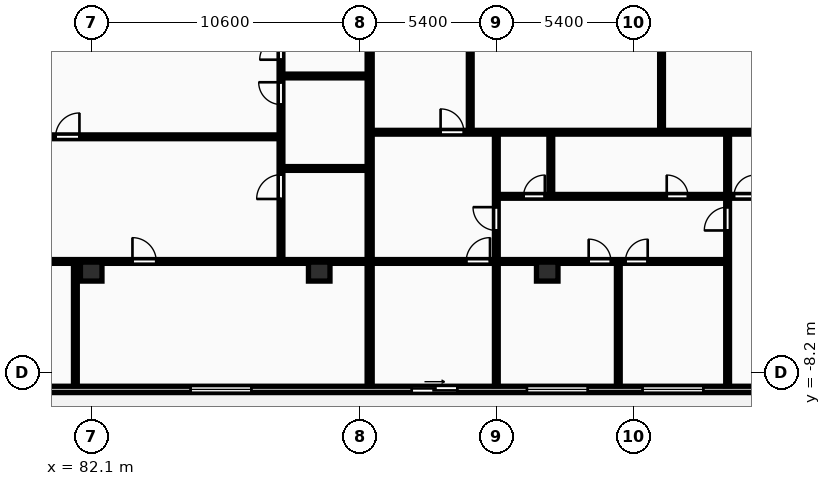
"""IFC4 building model, lengths in metres.
Left out: names, types, materials, properties, quantities, classifications, styles, units other than length and angle.
Written with IfcOpenShell. Run it as: python <this file> out.ifc"""

import sys

from ifc_helpers import new_model, si_unit, direction, frame, frame_2d, origin, origin_2d, place, context, subcontext, project, spatial, rectangle, extrude, element, fill, save


model = new_model("IFC4")
c1 = context("Model", 3, precision=1e-05, world=origin(), true_north=direction((0.0, 1.0)))
c2 = subcontext(c1, "Body", "Model", "MODEL_VIEW")
j1 = project(units=[si_unit("LENGTHUNIT", "METRE"), si_unit("PLANEANGLEUNIT", "RADIAN")], contexts=[c1])
p1 = place(None, origin())
s1 = spatial("IfcSite", under=j1, at=p1, CompositionType="ELEMENT")
p2 = place(p1, origin())
s2 = spatial("IfcBuilding", under=s1, at=p2, CompositionType="ELEMENT")
p3 = place(p2, frame((0.0, 0.0, 119.8)))
s3 = spatial("IfcBuildingStorey", under=s2, at=p3, CompositionType="ELEMENT", Elevation=119.8)
for number, where, z_axis, x_axis in (
    (1, (82.1, -4.2, 0.0), (0.0, 0.0, 1.0), (1.0, 0.0, 0.0)),
    (2, (91.1, -4.2, 0.0), (0.0, 0.0, 1.0), (1.0, 0.0, 0.0)),
    (3, (100.1, -4.2, 0.0), (0.0, 0.0, 1.0), (1.0, 0.0, 0.0)),
):
    element("IfcColumn", number, at=place(p3, frame(where, z_axis=z_axis, x_axis=x_axis)), inside=s3, PredefinedType="COLUMN", context=c2, shape_type="SweptSolid", body=[
        extrude(rectangle(XDim=0.85, YDim=0.75, at=origin_2d()), origin(), (0.0, 0.0, 1.0), 3.25),
    ])
p4 = place(p3, frame((72.7, -8.85, 0.0), z_axis=(0.0, 0.0, 1.0), x_axis=(1.0, 0.0, 0.0)))
e4 = element("IfcWall", 4, at=p4, inside=s3, PredefinedType="STANDARD", context=c2, shape_type="SweptSolid", body=[
    extrude(rectangle(XDim=58.0, YDim=0.25, at=frame_2d((29.0, 0.0))), origin(), (0.0, 0.0, 1.0), 2.97),
])
p5 = place(p4, frame((3.548, 0.0, 0.0)))
e5 = element("IfcOpeningElement", 5, at=p5, cuts=e4, PredefinedType="OPENING", context=c2, shape_type="SweptSolid", body=[
    extrude(rectangle(XDim=1.8, YDim=2.2, at=frame_2d((0.9, 1.1))), frame((0.0, 0.135, 0.0), z_axis=(0.0, -1.0, 0.0), x_axis=(1.0, 0.0, 0.0)), (0.0, 0.0, 1.0), 0.27),
])
p6 = place(p4, frame((13.323, 0.0, 0.85)))
e6 = element("IfcOpeningElement", 6, at=p6, cuts=e4, PredefinedType="OPENING", context=c2, shape_type="SweptSolid", body=[
    extrude(rectangle(XDim=2.4, YDim=1.9, at=frame_2d((1.2, 0.95))), frame((0.0, 0.135, 0.0), z_axis=(0.0, -1.0, 0.0), x_axis=(1.0, 0.0, 0.0)), (0.0, 0.0, 1.0), 0.27),
])
p7 = place(p4, frame((26.598, 0.0, 0.85)))
e7 = element("IfcOpeningElement", 7, at=p7, cuts=e4, PredefinedType="OPENING", context=c2, shape_type="SweptSolid", body=[
    extrude(rectangle(XDim=2.4, YDim=1.9, at=frame_2d((1.2, 0.95))), frame((0.0, 0.135, 0.0), z_axis=(0.0, -1.0, 0.0), x_axis=(1.0, 0.0, 0.0)), (0.0, 0.0, 1.0), 0.27),
])
p8 = place(p4, frame((31.163, 0.0, 0.85)))
e8 = element("IfcOpeningElement", 8, at=p8, cuts=e4, PredefinedType="OPENING", context=c2, shape_type="SweptSolid", body=[
    extrude(rectangle(XDim=2.4, YDim=1.9, at=frame_2d((1.2, 0.95))), frame((0.0, 0.135, 0.0), z_axis=(0.0, -1.0, 0.0), x_axis=(1.0, 0.0, 0.0)), (0.0, 0.0, 1.0), 0.27),
])
p9 = place(p4, frame((22.051, 0.0, 0.0)))
e9 = element("IfcOpeningElement", 9, at=p9, cuts=e4, PredefinedType="OPENING", context=c2, shape_type="SweptSolid", body=[
    extrude(rectangle(XDim=1.8, YDim=2.2, at=frame_2d((0.9, 1.1))), frame((0.0, 0.135, 0.0), z_axis=(0.0, -1.0, 0.0), x_axis=(1.0, 0.0, 0.0)), (0.0, 0.0, 1.0), 0.27),
])
p10 = place(p4, frame((35.861, 0.0, 0.85)))
e10 = element("IfcOpeningElement", 10, at=p10, cuts=e4, PredefinedType="OPENING", context=c2, shape_type="SweptSolid", body=[
    extrude(rectangle(XDim=2.4, YDim=1.9, at=frame_2d((1.2, 0.95))), frame((0.0, 0.135, 0.0), z_axis=(0.0, -1.0, 0.0), x_axis=(1.0, 0.0, 0.0)), (0.0, 0.0, 1.0), 0.27),
])
p11 = place(p4, frame((49.165, 0.0, 0.85)))
e11 = element("IfcOpeningElement", 11, at=p11, cuts=e4, PredefinedType="OPENING", context=c2, shape_type="SweptSolid", body=[
    extrude(rectangle(XDim=2.4, YDim=1.9, at=frame_2d((1.2, 0.95))), frame((0.0, 0.135, 0.0), z_axis=(0.0, -1.0, 0.0), x_axis=(1.0, 0.0, 0.0)), (0.0, 0.0, 1.0), 0.27),
])
p12 = place(p4, frame((42.661, 0.0, 0.0)))
e12 = element("IfcOpeningElement", 12, at=p12, cuts=e4, PredefinedType="OPENING", context=c2, shape_type="SweptSolid", body=[
    extrude(rectangle(XDim=1.8, YDim=2.2, at=frame_2d((0.9, 1.1))), frame((0.0, 0.135, 0.0), z_axis=(0.0, -1.0, 0.0), x_axis=(1.0, 0.0, 0.0)), (0.0, 0.0, 1.0), 0.27),
])
p13 = place(p4, frame((54.465, 0.0, 0.85)))
e13 = element("IfcOpeningElement", 13, at=p13, cuts=e4, PredefinedType="OPENING", context=c2, shape_type="SweptSolid", body=[
    extrude(rectangle(XDim=2.4, YDim=1.9, at=frame_2d((1.2, 0.95))), frame((0.0, 0.135, 0.0), z_axis=(0.0, -1.0, 0.0), x_axis=(1.0, 0.0, 0.0)), (0.0, 0.0, 1.0), 0.27),
])
p14 = place(p3, frame((93.091, -8.7, 0.0), z_axis=(0.0, 0.0, 1.0), x_axis=(0.0, 1.0, 0.0)))
e14 = element("IfcWall", 14, at=p14, inside=s3, PredefinedType="PARTITIONING", context=c2, shape_type="SweptSolid", body=[
    extrude(rectangle(XDim=24.57, YDim=0.2, at=frame_2d((12.285, 0.0))), origin(), (0.0, 0.0, 1.0), 2.97),
])
p15 = place(p3, frame((72.78, 1.12, 0.0), z_axis=(0.0, 0.0, 1.0), x_axis=(1.0, 0.0, 0.0)))
e15 = element("IfcWall", 15, at=p15, inside=s3, PredefinedType="PARTITIONING", context=c2, shape_type="SweptSolid", body=[
    extrude(rectangle(XDim=16.771, YDim=0.15, at=frame_2d((8.385, 0.0))), origin(), (0.0, 0.0, 1.0), 2.97),
])
p16 = place(p15, frame((7.915, 0.0, 0.0)))
e16 = element("IfcOpeningElement", 16, at=p16, cuts=e15, PredefinedType="OPENING", context=c2, shape_type="SweptSolid", body=[
    extrude(rectangle(XDim=0.94, YDim=2.1, at=frame_2d((0.47, 1.05))), frame((0.0, 0.085, 0.0), z_axis=(0.0, -1.0, 0.0), x_axis=(1.0, 0.0, 0.0)), (0.0, 0.0, 1.0), 0.17),
])
for number, where, z_axis, x_axis in (
    (17, (89.651, -0.13, 0.0), (0.0, 0.0, 1.0), (1.0, 0.0, 0.0)),
    (18, (89.651, 3.52, 0.0), (0.0, 0.0, 1.0), (1.0, 0.0, 0.0)),
):
    element("IfcWall", number, at=place(p3, frame(where, z_axis=z_axis, x_axis=x_axis)), inside=s3, PredefinedType="PARTITIONING", context=c2, shape_type="SweptSolid", body=[
        extrude(rectangle(XDim=3.36, YDim=0.15, at=frame_2d((1.68, 0.0))), origin(), (0.0, 0.0, 1.0), 2.97),
    ])
p17 = place(p3, frame((89.591, -3.74, 0.0), z_axis=(0.0, 0.0, 1.0), x_axis=(0.0, 1.0, 0.0)))
e19 = element("IfcWall", 19, at=p17, inside=s3, PredefinedType="PARTITIONING", context=c2, shape_type="SweptSolid", body=[
    extrude(rectangle(XDim=19.63, YDim=0.15, at=frame_2d((9.815, 0.0))), origin(), (0.0, 0.0, 1.0), 2.97),
])
p18 = place(p17, frame((2.406, 0.0, 0.0)))
e20 = element("IfcOpeningElement", 20, at=p18, cuts=e19, PredefinedType="OPENING", context=c2, shape_type="SweptSolid", body=[
    extrude(rectangle(XDim=0.96, YDim=2.1, at=frame_2d((0.48, 1.05))), frame((0.0, 0.085, 0.0), z_axis=(0.0, -1.0, 0.0), x_axis=(1.0, 0.0, 0.0)), (0.0, 0.0, 1.0), 0.17),
])
p19 = place(p17, frame((6.133, 0.0, 0.0)))
e21 = element("IfcOpeningElement", 21, at=p19, cuts=e19, PredefinedType="OPENING", context=c2, shape_type="SweptSolid", body=[
    extrude(rectangle(XDim=0.88, YDim=2.06, at=frame_2d((0.44, 1.03))), frame((0.0, 0.085, 0.0), z_axis=(0.0, -1.0, 0.0), x_axis=(1.0, 0.0, 0.0)), (0.0, 0.0, 1.0), 0.17),
])
p20 = place(p17, frame((7.903, 0.0, 0.0)))
e22 = element("IfcOpeningElement", 22, at=p20, cuts=e19, PredefinedType="OPENING", context=c2, shape_type="SweptSolid", body=[
    extrude(rectangle(XDim=0.84, YDim=2.04, at=frame_2d((0.42, 1.02))), frame((0.0, 0.085, 0.0), z_axis=(0.0, -1.0, 0.0), x_axis=(1.0, 0.0, 0.0)), (0.0, 0.0, 1.0), 0.17),
])
p21 = place(p3, frame((81.475, -8.7, 0.0), z_axis=(0.0, 0.0, 1.0), x_axis=(0.0, 1.0, 0.0)))
e23 = element("IfcWall", 23, at=p21, inside=s3, PredefinedType="PARTITIONING", context=c2, shape_type="SweptSolid", body=[
    extrude(rectangle(XDim=4.82, YDim=0.15, at=frame_2d((2.41, 0.0))), origin(), (0.0, 0.0, 1.0), 2.97),
])
p22 = place(p3, frame((72.78, -3.8, 0.0), z_axis=(0.0, 0.0, 1.0), x_axis=(1.0, 0.0, 0.0)))
e24 = element("IfcWall", 24, at=p22, inside=s3, PredefinedType="PARTITIONING", context=c2, shape_type="SweptSolid", body=[
    extrude(rectangle(XDim=20.231, YDim=0.15, at=frame_2d((10.115, 0.0))), origin(), (0.0, 0.0, 1.0), 2.97),
])
p23 = place(p22, frame((6.635, 0.0, 0.0)))
e25 = element("IfcOpeningElement", 25, at=p23, cuts=e24, PredefinedType="OPENING", context=c2, shape_type="SweptSolid", body=[
    extrude(rectangle(XDim=0.94, YDim=2.1, at=frame_2d((0.47, 1.05))), frame((0.0, 0.085, 0.0), z_axis=(0.0, -1.0, 0.0), x_axis=(1.0, 0.0, 0.0)), (0.0, 0.0, 1.0), 0.17),
])
p24 = place(p22, frame((10.948, 0.0, 0.0)))
e26 = element("IfcOpeningElement", 26, at=p24, cuts=e24, PredefinedType="OPENING", context=c2, shape_type="SweptSolid", body=[
    extrude(rectangle(XDim=0.94, YDim=2.1, at=frame_2d((0.47, 1.05))), frame((0.0, 0.085, 0.0), z_axis=(0.0, -1.0, 0.0), x_axis=(1.0, 0.0, 0.0)), (0.0, 0.0, 1.0), 0.17),
])
p25 = place(p3, frame((104.612, 1.34, 0.0), z_axis=(0.0, 0.0, 1.0), x_axis=(0.0, 1.0, 0.0)))
e27 = element("IfcWall", 27, at=p25, inside=s3, PredefinedType="PARTITIONING", context=c2, shape_type="SweptSolid", body=[
    extrude(rectangle(XDim=14.55, YDim=0.15, at=frame_2d((7.275, 0.0))), origin(), (0.0, 0.0, 1.0), 2.97),
])
p26 = place(p25, frame((6.365, 0.0, 0.0)))
e28 = element("IfcOpeningElement", 28, at=p26, cuts=e27, PredefinedType="OPENING", context=c2, shape_type="SweptSolid", body=[
    extrude(rectangle(XDim=0.84, YDim=2.04, at=frame_2d((0.42, 1.02))), frame((0.0, 0.085, 0.0), z_axis=(0.0, -1.0, 0.0), x_axis=(1.0, 0.0, 0.0)), (0.0, 0.0, 1.0), 0.17),
])
p27 = place(p25, frame((7.705, 0.0, 0.0)))
e29 = element("IfcOpeningElement", 29, at=p27, cuts=e27, PredefinedType="OPENING", context=c2, shape_type="SweptSolid", body=[
    extrude(rectangle(XDim=0.88, YDim=2.06, at=frame_2d((0.44, 1.03))), frame((0.0, 0.085, 0.0), z_axis=(0.0, -1.0, 0.0), x_axis=(1.0, 0.0, 0.0)), (0.0, 0.0, 1.0), 0.17),
])
p28 = place(p3, frame((97.061, 1.34, 0.0), z_axis=(0.0, 0.0, 1.0), x_axis=(0.0, 1.0, 0.0)))
e30 = element("IfcWall", 30, at=p28, inside=s3, PredefinedType="PARTITIONING", context=c2, shape_type="SweptSolid", body=[
    extrude(rectangle(XDim=14.55, YDim=0.15, at=frame_2d((7.275, 0.0))), origin(), (0.0, 0.0, 1.0), 2.97),
])
p29 = place(p28, frame((6.325, 0.0, 0.0)))
e31 = element("IfcOpeningElement", 31, at=p29, cuts=e30, PredefinedType="OPENING", context=c2, shape_type="SweptSolid", body=[
    extrude(rectangle(XDim=0.88, YDim=2.06, at=frame_2d((0.44, 1.03))), frame((0.0, 0.085, 0.0), z_axis=(0.0, -1.0, 0.0), x_axis=(1.0, 0.0, 0.0)), (0.0, 0.0, 1.0), 0.17),
])
p30 = place(p3, frame((100.241, -1.21, 0.0), z_axis=(0.0, 0.0, 1.0), x_axis=(0.0, 1.0, 0.0)))
e32 = element("IfcWall", 32, at=p30, inside=s3, PredefinedType="PARTITIONING", context=c2, shape_type="SweptSolid", body=[
    extrude(rectangle(XDim=2.47, YDim=0.15, at=frame_2d((1.235, 0.0))), origin(), (0.0, 0.0, 1.0), 2.2),
])
p31 = place(p3, frame((102.906, -8.7, 0.0), z_axis=(0.0, 0.0, 1.0), x_axis=(0.0, 1.0, 0.0)))
e33 = element("IfcWall", 33, at=p31, inside=s3, PredefinedType="PARTITIONING", context=c2, shape_type="SweptSolid", body=[
    extrude(rectangle(XDim=4.82, YDim=0.15, at=frame_2d((2.41, 0.0))), origin(), (0.0, 0.0, 1.0), 2.97),
])
p32 = place(p3, frame((98.091, -8.7, 0.0), z_axis=(0.0, 0.0, 1.0), x_axis=(0.0, 1.0, 0.0)))
e34 = element("IfcWall", 34, at=p32, inside=s3, PredefinedType="PARTITIONING", context=c2, shape_type="SweptSolid", body=[
    extrude(rectangle(XDim=9.96, YDim=0.15, at=frame_2d((4.98, 0.0))), origin(), (0.0, 0.0, 1.0), 2.97),
])
p33 = place(p32, frame((6.123, 0.0, 0.0)))
e35 = element("IfcOpeningElement", 35, at=p33, cuts=e34, PredefinedType="OPENING", context=c2, shape_type="SweptSolid", body=[
    extrude(rectangle(XDim=0.92, YDim=2.08, at=frame_2d((0.46, 1.04))), frame((0.0, 0.085, 0.0), z_axis=(0.0, -1.0, 0.0), x_axis=(1.0, 0.0, 0.0)), (0.0, 0.0, 1.0), 0.17),
])
p34 = place(p3, frame((107.22, -1.21, 0.0), z_axis=(0.0, 0.0, 1.0), x_axis=(0.0, 1.0, 0.0)))
e36 = element("IfcWall", 36, at=p34, inside=s3, PredefinedType="PARTITIONING", context=c2, shape_type="SweptSolid", body=[
    extrude(rectangle(XDim=2.47, YDim=0.15, at=frame_2d((1.235, 0.0))), origin(), (0.0, 0.0, 1.0), 2.97),
])
p35 = place(p3, frame((107.22, -8.7, 0.0), z_axis=(0.0, 0.0, 1.0), x_axis=(0.0, 1.0, 0.0)))
e37 = element("IfcWall", 37, at=p35, inside=s3, PredefinedType="PARTITIONING", context=c2, shape_type="SweptSolid", body=[
    extrude(rectangle(XDim=7.45, YDim=0.15, at=frame_2d((3.725, 0.0))), origin(), (0.0, 0.0, 1.0), 2.97),
])
p36 = place(p35, frame((6.123, 0.0, 0.0)))
e38 = element("IfcOpeningElement", 38, at=p36, cuts=e37, PredefinedType="OPENING", context=c2, shape_type="SweptSolid", body=[
    extrude(rectangle(XDim=0.92, YDim=2.08, at=frame_2d((0.46, 1.04))), frame((0.0, 0.085, 0.0), z_axis=(0.0, -1.0, 0.0), x_axis=(1.0, 0.0, 0.0)), (0.0, 0.0, 1.0), 0.17),
])
p37 = place(p3, frame((98.131, -1.23, 0.0), z_axis=(0.0, 0.0, 1.0), x_axis=(1.0, 0.0, 0.0)))
e39 = element("IfcWall", 39, at=p37, inside=s3, PredefinedType="PARTITIONING", context=c2, shape_type="SweptSolid", body=[
    extrude(rectangle(XDim=14.212, YDim=0.15, at=frame_2d((7.106, 0.0))), origin(), (0.0, 0.0, 1.0), 2.97),
])
p38 = place(p37, frame((1.034, 0.0, 0.0)))
e40 = element("IfcOpeningElement", 40, at=p38, cuts=e39, PredefinedType="OPENING", context=c2, shape_type="SweptSolid", body=[
    extrude(rectangle(XDim=0.84, YDim=2.04, at=frame_2d((0.42, 1.02))), frame((0.0, 0.085, 0.0), z_axis=(0.0, -1.0, 0.0), x_axis=(1.0, 0.0, 0.0)), (0.0, 0.0, 1.0), 0.17),
])
p39 = place(p37, frame((6.686, 0.0, 0.0)))
e41 = element("IfcOpeningElement", 41, at=p39, cuts=e39, PredefinedType="OPENING", context=c2, shape_type="SweptSolid", body=[
    extrude(rectangle(XDim=0.84, YDim=2.04, at=frame_2d((0.42, 1.02))), frame((0.0, 0.085, 0.0), z_axis=(0.0, -1.0, 0.0), x_axis=(1.0, 0.0, 0.0)), (0.0, 0.0, 1.0), 0.17),
])
p40 = place(p37, frame((9.339, 0.0, 0.0)))
e42 = element("IfcOpeningElement", 42, at=p40, cuts=e39, PredefinedType="OPENING", context=c2, shape_type="SweptSolid", body=[
    extrude(rectangle(XDim=0.84, YDim=2.04, at=frame_2d((0.42, 1.02))), frame((0.0, 0.085, 0.0), z_axis=(0.0, -1.0, 0.0), x_axis=(1.0, 0.0, 0.0)), (0.0, 0.0, 1.0), 0.17),
])
p41 = place(p3, frame((93.171, 1.3, 0.0), z_axis=(0.0, 0.0, 1.0), x_axis=(1.0, 0.0, 0.0)))
e43 = element("IfcWall", 43, at=p41, inside=s3, PredefinedType="PARTITIONING", context=c2, shape_type="SweptSolid", body=[
    extrude(rectangle(XDim=19.172, YDim=0.15, at=frame_2d((9.586, 0.0))), origin(), (0.0, 0.0, 1.0), 2.97),
])
p42 = place(p41, frame((2.72, 0.0, 0.0)))
e44 = element("IfcOpeningElement", 44, at=p42, cuts=e43, PredefinedType="OPENING", context=c2, shape_type="SweptSolid", body=[
    extrude(rectangle(XDim=0.92, YDim=2.08, at=frame_2d((0.46, 1.04))), frame((0.0, 0.085, 0.0), z_axis=(0.0, -1.0, 0.0), x_axis=(1.0, 0.0, 0.0)), (0.0, 0.0, 1.0), 0.17),
])
p43 = place(p3, frame((93.171, -3.8, 0.0), z_axis=(0.0, 0.0, 1.0), x_axis=(1.0, 0.0, 0.0)))
e45 = element("IfcWall", 45, at=p43, inside=s3, PredefinedType="PARTITIONING", context=c2, shape_type="SweptSolid", body=[
    extrude(rectangle(XDim=14.049, YDim=0.15, at=frame_2d((7.024, 0.0))), origin(), (0.0, 0.0, 1.0), 2.97),
])
p44 = place(p43, frame((3.73, 0.0, 0.0)))
e46 = element("IfcOpeningElement", 46, at=p44, cuts=e45, PredefinedType="OPENING", context=c2, shape_type="SweptSolid", body=[
    extrude(rectangle(XDim=0.94, YDim=2.1, at=frame_2d((0.47, 1.05))), frame((0.0, 0.085, 0.0), z_axis=(0.0, -1.0, 0.0), x_axis=(1.0, 0.0, 0.0)), (0.0, 0.0, 1.0), 0.17),
])
p45 = place(p43, frame((8.565, 0.0, 0.0)))
e47 = element("IfcOpeningElement", 47, at=p45, cuts=e45, PredefinedType="OPENING", context=c2, shape_type="SweptSolid", body=[
    extrude(rectangle(XDim=0.88, YDim=2.06, at=frame_2d((0.44, 1.03))), frame((0.0, 0.085, 0.0), z_axis=(0.0, -1.0, 0.0), x_axis=(1.0, 0.0, 0.0)), (0.0, 0.0, 1.0), 0.17),
])
p46 = place(p43, frame((10.014, 0.0, 0.0)))
e48 = element("IfcOpeningElement", 48, at=p46, cuts=e45, PredefinedType="OPENING", context=c2, shape_type="SweptSolid", body=[
    extrude(rectangle(XDim=0.88, YDim=2.06, at=frame_2d((0.44, 1.03))), frame((0.0, 0.085, 0.0), z_axis=(0.0, -1.0, 0.0), x_axis=(1.0, 0.0, 0.0)), (0.0, 0.0, 1.0), 0.17),
])
p47 = place(p6, origin())
e49 = element("IfcWindow", 49, at=p47, inside=s3, PartitioningType="DOUBLE_PANEL_VERTICAL", PredefinedType="WINDOW", context=c2, shape_type="SweptSolid", body=[
    extrude(rectangle(XDim=2.4, YDim=1.9, at=frame_2d((1.2, 0.95))), frame((0.0, 0.03, 0.0), z_axis=(0.0, -1.0, 0.0), x_axis=(1.0, 0.0, 0.0)), (0.0, 0.0, 1.0), 0.06),
])
fill(e6, e49)
p48 = place(p7, origin())
e50 = element("IfcWindow", 50, at=p48, inside=s3, PartitioningType="DOUBLE_PANEL_VERTICAL", PredefinedType="WINDOW", context=c2, shape_type="SweptSolid", body=[
    extrude(rectangle(XDim=2.4, YDim=1.9, at=frame_2d((1.2, 0.95))), frame((0.0, 0.03, 0.0), z_axis=(0.0, -1.0, 0.0), x_axis=(1.0, 0.0, 0.0)), (0.0, 0.0, 1.0), 0.06),
])
fill(e7, e50)
p49 = place(p8, origin())
e51 = element("IfcWindow", 51, at=p49, inside=s3, PartitioningType="DOUBLE_PANEL_VERTICAL", PredefinedType="WINDOW", context=c2, shape_type="SweptSolid", body=[
    extrude(rectangle(XDim=2.4, YDim=1.9, at=frame_2d((1.2, 0.95))), frame((0.0, 0.03, 0.0), z_axis=(0.0, -1.0, 0.0), x_axis=(1.0, 0.0, 0.0)), (0.0, 0.0, 1.0), 0.06),
])
fill(e8, e51)
p50 = place(p9, origin())
e52 = element("IfcDoor", 52, at=p50, inside=s3, OperationType="SLIDING_TO_RIGHT", PredefinedType="DOOR", context=c2, shape_type="SweptSolid", body=[
    extrude(rectangle(XDim=1.8, YDim=2.2, at=frame_2d((0.9, 1.1))), frame((0.0, 0.025, 0.0), z_axis=(0.0, -1.0, 0.0), x_axis=(1.0, 0.0, 0.0)), (0.0, 0.0, 1.0), 0.05),
])
fill(e9, e52)
p51 = place(p16, origin())
e53 = element("IfcDoor", 53, at=p51, inside=s3, OperationType="SINGLE_SWING_RIGHT", PredefinedType="DOOR", context=c2, shape_type="SweptSolid", body=[
    extrude(rectangle(XDim=0.94, YDim=2.1, at=frame_2d((0.47, 1.05))), frame((0.0, 0.025, 0.0), z_axis=(0.0, -1.0, 0.0), x_axis=(1.0, 0.0, 0.0)), (0.0, 0.0, 1.0), 0.05),
])
fill(e16, e53)
p52 = place(p18, origin())
e54 = element("IfcDoor", 54, at=p52, inside=s3, OperationType="SINGLE_SWING_LEFT", PredefinedType="DOOR", context=c2, shape_type="SweptSolid", body=[
    extrude(rectangle(XDim=0.96, YDim=2.1, at=frame_2d((0.48, 1.05))), frame((0.0, 0.025, 0.0), z_axis=(0.0, -1.0, 0.0), x_axis=(1.0, 0.0, 0.0)), (0.0, 0.0, 1.0), 0.05),
])
fill(e20, e54)
p53 = place(p19, origin())
e55 = element("IfcDoor", 55, at=p53, inside=s3, OperationType="SINGLE_SWING_RIGHT", PredefinedType="DOOR", context=c2, shape_type="SweptSolid", body=[
    extrude(rectangle(XDim=0.88, YDim=2.06, at=frame_2d((0.44, 1.03))), frame((0.0, 0.025, 0.0), z_axis=(0.0, -1.0, 0.0), x_axis=(1.0, 0.0, 0.0)), (0.0, 0.0, 1.0), 0.05),
])
fill(e21, e55)
p54 = place(p20, origin())
e56 = element("IfcDoor", 56, at=p54, inside=s3, OperationType="SINGLE_SWING_LEFT", PredefinedType="DOOR", context=c2, shape_type="SweptSolid", body=[
    extrude(rectangle(XDim=0.84, YDim=2.04, at=frame_2d((0.42, 1.02))), frame((0.0, 0.025, 0.0), z_axis=(0.0, -1.0, 0.0), x_axis=(1.0, 0.0, 0.0)), (0.0, 0.0, 1.0), 0.05),
])
fill(e22, e56)
p55 = place(p24, origin())
e57 = element("IfcDoor", 57, at=p55, inside=s3, OperationType="SINGLE_SWING_LEFT", PredefinedType="DOOR", context=c2, shape_type="SweptSolid", body=[
    extrude(rectangle(XDim=0.94, YDim=2.1, at=frame_2d((0.47, 1.05))), frame((0.0, 0.025, 0.0), z_axis=(0.0, -1.0, 0.0), x_axis=(1.0, 0.0, 0.0)), (0.0, 0.0, 1.0), 0.05),
])
fill(e26, e57)
p56 = place(p33, origin())
e58 = element("IfcDoor", 58, at=p56, inside=s3, OperationType="SINGLE_SWING_RIGHT", PredefinedType="DOOR", context=c2, shape_type="SweptSolid", body=[
    extrude(rectangle(XDim=0.92, YDim=2.08, at=frame_2d((0.46, 1.04))), frame((0.0, 0.025, 0.0), z_axis=(0.0, -1.0, 0.0), x_axis=(1.0, 0.0, 0.0)), (0.0, 0.0, 1.0), 0.05),
])
fill(e35, e58)
p57 = place(p36, origin())
e59 = element("IfcDoor", 59, at=p57, inside=s3, OperationType="SINGLE_SWING_LEFT", PredefinedType="DOOR", context=c2, shape_type="SweptSolid", body=[
    extrude(rectangle(XDim=0.92, YDim=2.08, at=frame_2d((0.46, 1.04))), frame((0.0, 0.025, 0.0), z_axis=(0.0, -1.0, 0.0), x_axis=(1.0, 0.0, 0.0)), (0.0, 0.0, 1.0), 0.05),
])
fill(e38, e59)
p58 = place(p38, origin())
e60 = element("IfcDoor", 60, at=p58, inside=s3, OperationType="SINGLE_SWING_RIGHT", PredefinedType="DOOR", context=c2, shape_type="SweptSolid", body=[
    extrude(rectangle(XDim=0.84, YDim=2.04, at=frame_2d((0.42, 1.02))), frame((0.0, 0.025, 0.0), z_axis=(0.0, -1.0, 0.0), x_axis=(1.0, 0.0, 0.0)), (0.0, 0.0, 1.0), 0.05),
])
fill(e40, e60)
p59 = place(p39, origin())
e61 = element("IfcDoor", 61, at=p59, inside=s3, OperationType="SINGLE_SWING_LEFT", PredefinedType="DOOR", context=c2, shape_type="SweptSolid", body=[
    extrude(rectangle(XDim=0.84, YDim=2.04, at=frame_2d((0.42, 1.02))), frame((0.0, 0.025, 0.0), z_axis=(0.0, -1.0, 0.0), x_axis=(1.0, 0.0, 0.0)), (0.0, 0.0, 1.0), 0.05),
])
fill(e41, e61)
p60 = place(p40, origin())
e62 = element("IfcDoor", 62, at=p60, inside=s3, OperationType="SINGLE_SWING_RIGHT", PredefinedType="DOOR", context=c2, shape_type="SweptSolid", body=[
    extrude(rectangle(XDim=0.84, YDim=2.04, at=frame_2d((0.42, 1.02))), frame((0.0, 0.025, 0.0), z_axis=(0.0, -1.0, 0.0), x_axis=(1.0, 0.0, 0.0)), (0.0, 0.0, 1.0), 0.05),
])
fill(e42, e62)
p61 = place(p42, origin())
e63 = element("IfcDoor", 63, at=p61, inside=s3, OperationType="SINGLE_SWING_LEFT", PredefinedType="DOOR", context=c2, shape_type="SweptSolid", body=[
    extrude(rectangle(XDim=0.92, YDim=2.08, at=frame_2d((0.46, 1.04))), frame((0.0, 0.025, 0.0), z_axis=(0.0, -1.0, 0.0), x_axis=(1.0, 0.0, 0.0)), (0.0, 0.0, 1.0), 0.05),
])
fill(e44, e63)
p62 = place(p44, origin())
e64 = element("IfcDoor", 64, at=p62, inside=s3, OperationType="SINGLE_SWING_RIGHT", PredefinedType="DOOR", context=c2, shape_type="SweptSolid", body=[
    extrude(rectangle(XDim=0.94, YDim=2.1, at=frame_2d((0.47, 1.05))), frame((0.0, 0.025, 0.0), z_axis=(0.0, -1.0, 0.0), x_axis=(1.0, 0.0, 0.0)), (0.0, 0.0, 1.0), 0.05),
])
fill(e46, e64)
p63 = place(p45, origin())
e65 = element("IfcDoor", 65, at=p63, inside=s3, OperationType="SINGLE_SWING_LEFT", PredefinedType="DOOR", context=c2, shape_type="SweptSolid", body=[
    extrude(rectangle(XDim=0.88, YDim=2.06, at=frame_2d((0.44, 1.03))), frame((0.0, 0.025, 0.0), z_axis=(0.0, -1.0, 0.0), x_axis=(1.0, 0.0, 0.0)), (0.0, 0.0, 1.0), 0.05),
])
fill(e47, e65)
p64 = place(p46, origin())
e66 = element("IfcDoor", 66, at=p64, inside=s3, OperationType="SINGLE_SWING_RIGHT", PredefinedType="DOOR", context=c2, shape_type="SweptSolid", body=[
    extrude(rectangle(XDim=0.88, YDim=2.06, at=frame_2d((0.44, 1.03))), frame((0.0, 0.025, 0.0), z_axis=(0.0, -1.0, 0.0), x_axis=(1.0, 0.0, 0.0)), (0.0, 0.0, 1.0), 0.05),
])
fill(e48, e66)
save(model, sys.argv[1])
